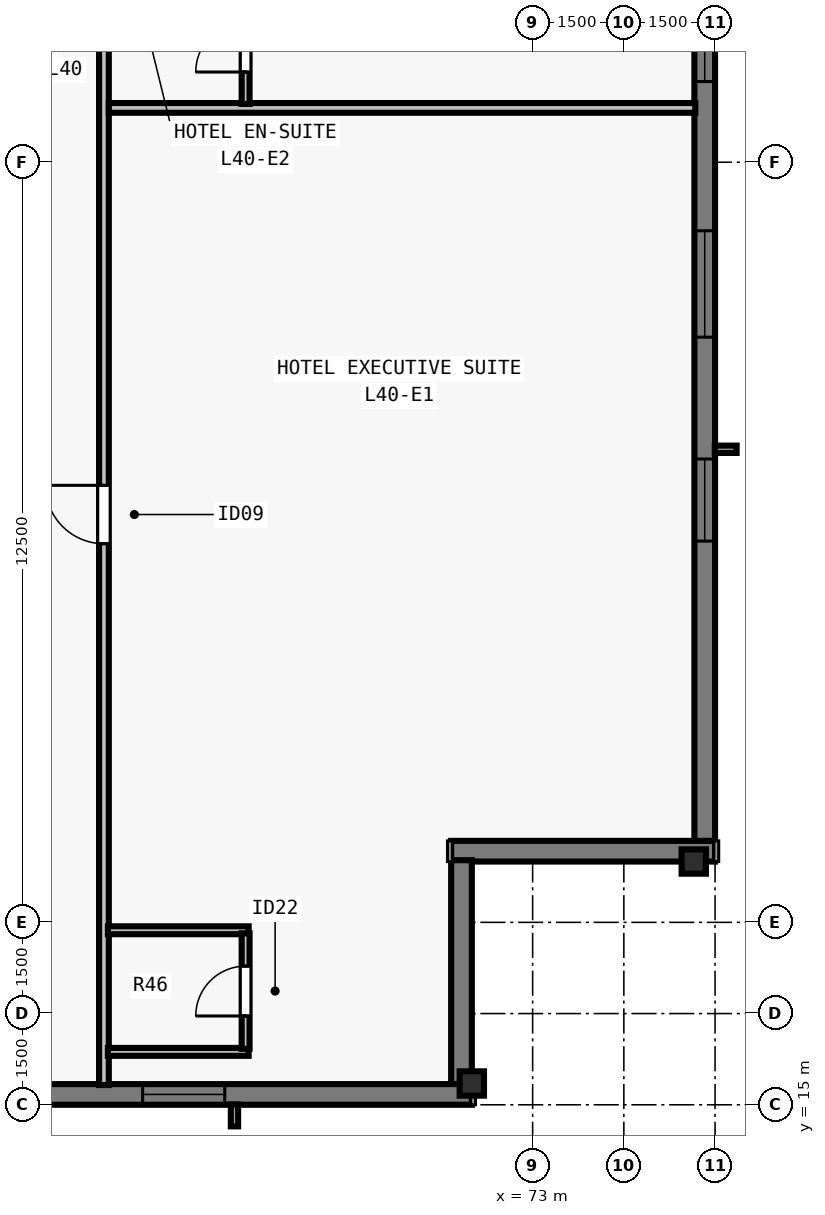
"""IFC4 building model, lengths in metres.
Left out: names, types, materials, properties, quantities, classifications, styles, units other than length and angle.
Written with IfcOpenShell. Run it as: python <this file> out.ifc"""

import sys

from ifc_helpers import new_model, si_unit, direction, frame, frame_2d, origin, origin_2d, place, context, subcontext, project, spatial, rectangle, i_section, extrude, element, fill, save


model = new_model("IFC4")
c1 = context("Model", 3, precision=1e-05, world=origin(), true_north=direction((0.0, 1.0)))
c2 = subcontext(c1, "Body", "Model", "MODEL_VIEW")
j1 = project(units=[si_unit("LENGTHUNIT", "METRE"), si_unit("PLANEANGLEUNIT", "RADIAN")], contexts=[c1])
p1 = place(None, origin())
s1 = spatial("IfcSite", under=j1, at=p1, CompositionType="ELEMENT")
p2 = place(p1, origin())
s2 = spatial("IfcBuilding", under=s1, at=p2, CompositionType="ELEMENT")
p3 = place(p2, frame((0.0, 0.0, 148.0)))
s3 = spatial("IfcBuildingStorey", under=s2, at=p3, CompositionType="ELEMENT", Elevation=148.0)
for number, where, z_axis, x_axis in (
    (1, (72.0, 15.35, 0.0), (0.0, 0.0, 1.0), (1.0, 0.0, 0.0)),
    (2, (75.65, 19.0, 0.0), (0.0, 0.0, 1.0), (0.0, 1.0, 0.0)),
):
    element("IfcColumn", number, at=place(p3, frame(where, z_axis=z_axis, x_axis=x_axis)), inside=s3, PredefinedType="COLUMN", context=c2, shape_type="SweptSolid", body=[
        extrude(i_section(OverallWidth=0.4, OverallDepth=0.4, WebThickness=0.022, FlangeThickness=0.036, at=origin_2d()), origin(), (0.0, 0.0, 1.0), 3.5),
    ])
p4 = place(p3, frame((75.83, 59.0, 0.0), z_axis=(0.0, 0.0, 1.0), x_axis=(0.0, -1.0, 0.0)))
e3 = element("IfcWall", 3, at=p4, inside=s3, PredefinedType="SOLIDWALL", context=c2, shape_type="SweptSolid", body=[
    extrude(rectangle(XDim=39.682, YDim=0.34, at=frame_2d((19.841, 0.0))), origin(), (0.0, 0.0, 1.0), 3.28),
])
p5 = place(p4, frame((4.952, 0.0, 0.8)))
e4 = element("IfcOpeningElement", 4, at=p5, cuts=e3, PredefinedType="OPENING", context=c2, shape_type="SweptSolid", body=[
    extrude(rectangle(XDim=1.35, YDim=1.66, at=frame_2d((0.675, 0.83))), frame((0.0, 0.18, 0.0), z_axis=(0.0, -1.0, 0.0), x_axis=(1.0, 0.0, 0.0)), (0.0, 0.0, 1.0), 0.36),
])
p6 = place(p4, frame((8.305, 0.0, 0.8)))
e5 = element("IfcOpeningElement", 5, at=p6, cuts=e3, PredefinedType="OPENING", context=c2, shape_type="SweptSolid", body=[
    extrude(rectangle(XDim=1.75, YDim=1.66, at=frame_2d((0.875, 0.83))), frame((0.0, 0.18, 0.0), z_axis=(0.0, -1.0, 0.0), x_axis=(1.0, 0.0, 0.0)), (0.0, 0.0, 1.0), 0.36),
])
p7 = place(p4, frame((12.909, 0.0, 0.8)))
e6 = element("IfcOpeningElement", 6, at=p7, cuts=e3, PredefinedType="OPENING", context=c2, shape_type="SweptSolid", body=[
    extrude(rectangle(XDim=1.35, YDim=1.66, at=frame_2d((0.675, 0.83))), frame((0.0, 0.18, 0.0), z_axis=(0.0, -1.0, 0.0), x_axis=(1.0, 0.0, 0.0)), (0.0, 0.0, 1.0), 0.36),
])
p8 = place(p4, frame((16.262, 0.0, 0.8)))
e7 = element("IfcOpeningElement", 7, at=p8, cuts=e3, PredefinedType="OPENING", context=c2, shape_type="SweptSolid", body=[
    extrude(rectangle(XDim=1.75, YDim=1.66, at=frame_2d((0.875, 0.83))), frame((0.0, 0.18, 0.0), z_axis=(0.0, -1.0, 0.0), x_axis=(1.0, 0.0, 0.0)), (0.0, 0.0, 1.0), 0.36),
])
p9 = place(p4, frame((19.166, 0.0, 0.8)))
e8 = element("IfcOpeningElement", 8, at=p9, cuts=e3, PredefinedType="OPENING", context=c2, shape_type="SweptSolid", body=[
    extrude(rectangle(XDim=1.35, YDim=1.66, at=frame_2d((0.675, 0.83))), frame((0.0, 0.18, 0.0), z_axis=(0.0, -1.0, 0.0), x_axis=(1.0, 0.0, 0.0)), (0.0, 0.0, 1.0), 0.36),
])
p10 = place(p4, frame((22.07, 0.0, 0.8)))
e9 = element("IfcOpeningElement", 9, at=p10, cuts=e3, PredefinedType="OPENING", context=c2, shape_type="SweptSolid", body=[
    extrude(rectangle(XDim=1.75, YDim=1.66, at=frame_2d((0.875, 0.83))), frame((0.0, 0.18, 0.0), z_axis=(0.0, -1.0, 0.0), x_axis=(1.0, 0.0, 0.0)), (0.0, 0.0, 1.0), 0.36),
])
p11 = place(p4, frame((25.823, 0.0, 0.8)))
e10 = element("IfcOpeningElement", 10, at=p11, cuts=e3, PredefinedType="OPENING", context=c2, shape_type="SweptSolid", body=[
    extrude(rectangle(XDim=1.35, YDim=1.66, at=frame_2d((0.675, 0.83))), frame((0.0, 0.18, 0.0), z_axis=(0.0, -1.0, 0.0), x_axis=(1.0, 0.0, 0.0)), (0.0, 0.0, 1.0), 0.36),
])
p12 = place(p4, frame((29.627, 0.0, 0.8)))
e11 = element("IfcOpeningElement", 11, at=p12, cuts=e3, PredefinedType="OPENING", context=c2, shape_type="SweptSolid", body=[
    extrude(rectangle(XDim=1.75, YDim=1.66, at=frame_2d((0.875, 0.83))), frame((0.0, 0.18, 0.0), z_axis=(0.0, -1.0, 0.0), x_axis=(1.0, 0.0, 0.0)), (0.0, 0.0, 1.0), 0.36),
])
p13 = place(p4, frame((33.38, 0.0, 0.8)))
e12 = element("IfcOpeningElement", 12, at=p13, cuts=e3, PredefinedType="OPENING", context=c2, shape_type="SweptSolid", body=[
    extrude(rectangle(XDim=1.35, YDim=1.66, at=frame_2d((0.675, 0.83))), frame((0.0, 0.18, 0.0), z_axis=(0.0, -1.0, 0.0), x_axis=(1.0, 0.0, 0.0)), (0.0, 0.0, 1.0), 0.36),
])
p14 = place(p3, frame((76.0, 19.17, 0.0), z_axis=(0.0, 0.0, 1.0), x_axis=(-1.0, 0.0, 0.0)))
e13 = element("IfcWall", 13, at=p14, inside=s3, PredefinedType="SOLIDWALL", context=c2, shape_type="SweptSolid", body=[
    extrude(rectangle(XDim=4.34, YDim=0.34, at=frame_2d((2.17, 0.0))), origin(), (0.0, 0.0, 1.0), 3.28),
])
p15 = place(p3, frame((71.83, 19.022, 0.0), z_axis=(0.0, 0.0, 1.0), x_axis=(0.0, -1.0, 0.0)))
e14 = element("IfcWall", 14, at=p15, inside=s3, PredefinedType="SOLIDWALL", context=c2, shape_type="SweptSolid", body=[
    extrude(rectangle(XDim=3.704, YDim=0.34, at=frame_2d((1.852, 0.0))), origin(), (0.0, 0.0, 1.0), 3.28),
])
p16 = place(p3, frame((72.0, 15.17, 0.0), z_axis=(0.0, 0.0, 1.0), x_axis=(-1.0, 0.0, 0.0)))
e15 = element("IfcWall", 15, at=p16, inside=s3, PredefinedType="SOLIDWALL", context=c2, shape_type="SweptSolid", body=[
    extrude(rectangle(XDim=25.082, YDim=0.34, at=frame_2d((12.541, 0.0))), origin(), (0.0, 0.0, 1.0), 3.28),
])
p17 = place(p16, frame((4.063, 0.0, 0.8)))
e16 = element("IfcOpeningElement", 16, at=p17, cuts=e15, PredefinedType="OPENING", context=c2, shape_type="SweptSolid", body=[
    extrude(rectangle(XDim=1.35, YDim=1.66, at=frame_2d((0.675, 0.83))), frame((0.0, 0.18, 0.0), z_axis=(0.0, -1.0, 0.0), x_axis=(1.0, 0.0, 0.0)), (0.0, 0.0, 1.0), 0.36),
])
p18 = place(p16, frame((8.64, 0.0, 0.8)))
e17 = element("IfcOpeningElement", 17, at=p18, cuts=e15, PredefinedType="OPENING", context=c2, shape_type="SweptSolid", body=[
    extrude(rectangle(XDim=1.75, YDim=1.66, at=frame_2d((0.875, 0.83))), frame((0.0, 0.18, 0.0), z_axis=(0.0, -1.0, 0.0), x_axis=(1.0, 0.0, 0.0)), (0.0, 0.0, 1.0), 0.36),
])
p19 = place(p16, frame((11.866, 0.0, 0.8)))
e18 = element("IfcOpeningElement", 18, at=p19, cuts=e15, PredefinedType="OPENING", context=c2, shape_type="SweptSolid", body=[
    extrude(rectangle(XDim=1.35, YDim=1.66, at=frame_2d((0.675, 0.83))), frame((0.0, 0.18, 0.0), z_axis=(0.0, -1.0, 0.0), x_axis=(1.0, 0.0, 0.0)), (0.0, 0.0, 1.0), 0.36),
])
p20 = place(p16, frame((15.992, 0.0, 0.8)))
e19 = element("IfcOpeningElement", 19, at=p20, cuts=e15, PredefinedType="OPENING", context=c2, shape_type="SweptSolid", body=[
    extrude(rectangle(XDim=1.75, YDim=1.66, at=frame_2d((0.875, 0.83))), frame((0.0, 0.18, 0.0), z_axis=(0.0, -1.0, 0.0), x_axis=(1.0, 0.0, 0.0)), (0.0, 0.0, 1.0), 0.36),
])
p21 = place(p3, frame((65.95, 15.325, 0.0), z_axis=(0.0, 0.0, 1.0), x_axis=(0.0, 1.0, 0.0)))
e20 = element("IfcWall", 20, at=p21, inside=s3, PredefinedType="PARTITIONING", context=c2, shape_type="SweptSolid", body=[
    extrude(rectangle(XDim=47.35, YDim=0.16, at=frame_2d((23.675, 0.0))), origin(), (0.0, 0.0, 1.0), 2.555),
])
p22 = place(p21, frame((8.902, 0.0, 0.0)))
e21 = element("IfcOpeningElement", 21, at=p22, cuts=e20, PredefinedType="OPENING", context=c2, shape_type="SweptSolid", body=[
    extrude(rectangle(XDim=0.96, YDim=2.15, at=frame_2d((0.48, 1.075))), frame((0.0, 0.09, 0.0), z_axis=(0.0, -1.0, 0.0), x_axis=(1.0, 0.0, 0.0)), (0.0, 0.0, 1.0), 0.18),
])
p23 = place(p21, frame((24.309, 0.0, 0.0)))
e22 = element("IfcOpeningElement", 22, at=p23, cuts=e20, PredefinedType="OPENING", context=c2, shape_type="SweptSolid", body=[
    extrude(rectangle(XDim=0.96, YDim=2.15, at=frame_2d((0.48, 1.075))), frame((0.0, 0.09, 0.0), z_axis=(0.0, -1.0, 0.0), x_axis=(1.0, 0.0, 0.0)), (0.0, 0.0, 1.0), 0.18),
])
p24 = place(p21, frame((39.902, 0.0, 0.0)))
e23 = element("IfcOpeningElement", 23, at=p24, cuts=e20, PredefinedType="OPENING", context=c2, shape_type="SweptSolid", body=[
    extrude(rectangle(XDim=0.96, YDim=2.15, at=frame_2d((0.48, 1.075))), frame((0.0, 0.09, 0.0), z_axis=(0.0, -1.0, 0.0), x_axis=(1.0, 0.0, 0.0)), (0.0, 0.0, 1.0), 0.18),
])
for number, where, z_axis, x_axis in (
    (24, (66.015, 15.87, 0.0), (0.0, 0.0, 1.0), (1.0, 0.0, 0.0)),
    (25, (66.015, 17.87, 0.0), (0.0, 0.0, 1.0), (1.0, 0.0, 0.0)),
):
    element("IfcWall", number, at=place(p3, frame(where, z_axis=z_axis, x_axis=x_axis)), inside=s3, PredefinedType="PLUMBINGWALL", context=c2, shape_type="SweptSolid", body=[
        extrude(rectangle(XDim=2.315, YDim=0.13, at=frame_2d((1.158, 0.0))), origin(), (0.0, 0.0, 1.0), 3.28),
    ])
p25 = place(p3, frame((68.28, 15.92, 0.0), z_axis=(0.0, 0.0, 1.0), x_axis=(0.0, 1.0, 0.0)))
e26 = element("IfcWall", 26, at=p25, inside=s3, PredefinedType="PLUMBINGWALL", context=c2, shape_type="SweptSolid", body=[
    extrude(rectangle(XDim=1.9, YDim=0.13, at=frame_2d((0.95, 0.0))), origin(), (0.0, 0.0, 1.0), 3.28),
])
p26 = place(p25, frame((0.54, 0.0, 0.0)))
e27 = element("IfcOpeningElement", 27, at=p26, cuts=e26, PredefinedType="OPENING", context=c2, shape_type="SweptSolid", body=[
    extrude(rectangle(XDim=0.82, YDim=2.1, at=frame_2d((0.41, 1.05))), frame((0.0, 0.075, 0.0), z_axis=(0.0, -1.0, 0.0), x_axis=(1.0, 0.0, 0.0)), (0.0, 0.0, 1.0), 0.15),
])
p27 = place(p3, frame((66.03, 31.394, 0.0), z_axis=(0.0, 0.0, 1.0), x_axis=(1.0, 0.0, 0.0)))
e28 = element("IfcWall", 28, at=p27, inside=s3, PredefinedType="PARTITIONING", context=c2, shape_type="SweptSolid", body=[
    extrude(rectangle(XDim=9.645, YDim=0.16, at=frame_2d((4.823, 0.0))), origin(), (0.0, 0.0, 1.0), 3.28),
])
p28 = place(p3, frame((68.28, 31.458, 0.0), z_axis=(0.0, 0.0, 1.0), x_axis=(0.0, 1.0, 0.0)))
e29 = element("IfcWall", 29, at=p28, inside=s3, PredefinedType="PLUMBINGWALL", context=c2, shape_type="SweptSolid", body=[
    extrude(rectangle(XDim=1.885, YDim=0.13, at=frame_2d((0.942, 0.0))), origin(), (0.0, 0.0, 1.0), 3.28),
])
p29 = place(p28, frame((0.525, 0.0, 0.0)))
e30 = element("IfcOpeningElement", 30, at=p29, cuts=e29, PredefinedType="OPENING", context=c2, shape_type="SweptSolid", body=[
    extrude(rectangle(XDim=0.82, YDim=2.1, at=frame_2d((0.41, 1.05))), frame((0.0, 0.075, 0.0), z_axis=(0.0, -1.0, 0.0), x_axis=(1.0, 0.0, 0.0)), (0.0, 0.0, 1.0), 0.15),
])
p30 = place(p11, origin())
e31 = element("IfcWindow", 31, at=p30, inside=s3, PartitioningType="SINGLE_PANEL", PredefinedType="WINDOW", context=c2, shape_type="SweptSolid", body=[
    extrude(rectangle(XDim=1.35, YDim=1.66, at=frame_2d((0.675, 0.83))), frame((0.0, -0.05, 0.0), z_axis=(0.0, -1.0, 0.0), x_axis=(1.0, 0.0, 0.0)), (0.0, 0.0, 1.0), 0.06),
])
fill(e10, e31)
p31 = place(p12, origin())
e32 = element("IfcWindow", 32, at=p31, inside=s3, PartitioningType="SINGLE_PANEL", PredefinedType="WINDOW", context=c2, shape_type="SweptSolid", body=[
    extrude(rectangle(XDim=1.75, YDim=1.66, at=frame_2d((0.875, 0.83))), frame((0.0, -0.05, 0.0), z_axis=(0.0, -1.0, 0.0), x_axis=(1.0, 0.0, 0.0)), (0.0, 0.0, 1.0), 0.06),
])
fill(e11, e32)
p32 = place(p13, origin())
e33 = element("IfcWindow", 33, at=p32, inside=s3, PartitioningType="SINGLE_PANEL", PredefinedType="WINDOW", context=c2, shape_type="SweptSolid", body=[
    extrude(rectangle(XDim=1.35, YDim=1.66, at=frame_2d((0.675, 0.83))), frame((0.0, -0.05, 0.0), z_axis=(0.0, -1.0, 0.0), x_axis=(1.0, 0.0, 0.0)), (0.0, 0.0, 1.0), 0.06),
])
fill(e12, e33)
p33 = place(p17, origin())
e34 = element("IfcWindow", 34, at=p33, inside=s3, PartitioningType="SINGLE_PANEL", PredefinedType="WINDOW", context=c2, shape_type="SweptSolid", body=[
    extrude(rectangle(XDim=1.35, YDim=1.66, at=frame_2d((0.675, 0.83))), frame((0.0, -0.05, 0.0), z_axis=(0.0, -1.0, 0.0), x_axis=(1.0, 0.0, 0.0)), (0.0, 0.0, 1.0), 0.06),
])
fill(e16, e34)
p34 = place(p26, origin())
e35 = element("IfcDoor", 35, at=p34, inside=s3, OperationType="SINGLE_SWING_LEFT", PredefinedType="DOOR", context=c2, shape_type="SweptSolid", body=[
    extrude(rectangle(XDim=0.82, YDim=2.1, at=frame_2d((0.41, 1.05))), frame((0.0, 0.025, 0.0), z_axis=(0.0, -1.0, 0.0), x_axis=(1.0, 0.0, 0.0)), (0.0, 0.0, 1.0), 0.05),
])
fill(e27, e35)
p35 = place(p22, origin())
e36 = element("IfcDoor", 36, at=p35, inside=s3, OperationType="SINGLE_SWING_RIGHT", PredefinedType="DOOR", context=c2, shape_type="SweptSolid", body=[
    extrude(rectangle(XDim=0.96, YDim=2.15, at=frame_2d((0.48, 1.075))), frame((0.0, 0.025, 0.0), z_axis=(0.0, -1.0, 0.0), x_axis=(1.0, 0.0, 0.0)), (0.0, 0.0, 1.0), 0.05),
])
fill(e21, e36)
p36 = place(p29, origin())
e37 = element("IfcDoor", 37, at=p36, inside=s3, OperationType="SINGLE_SWING_LEFT", PredefinedType="DOOR", context=c2, shape_type="SweptSolid", body=[
    extrude(rectangle(XDim=0.82, YDim=2.1, at=frame_2d((0.41, 1.05))), frame((0.0, 0.025, 0.0), z_axis=(0.0, -1.0, 0.0), x_axis=(1.0, 0.0, 0.0)), (0.0, 0.0, 1.0), 0.05),
])
fill(e30, e37)
save(model, sys.argv[1])
